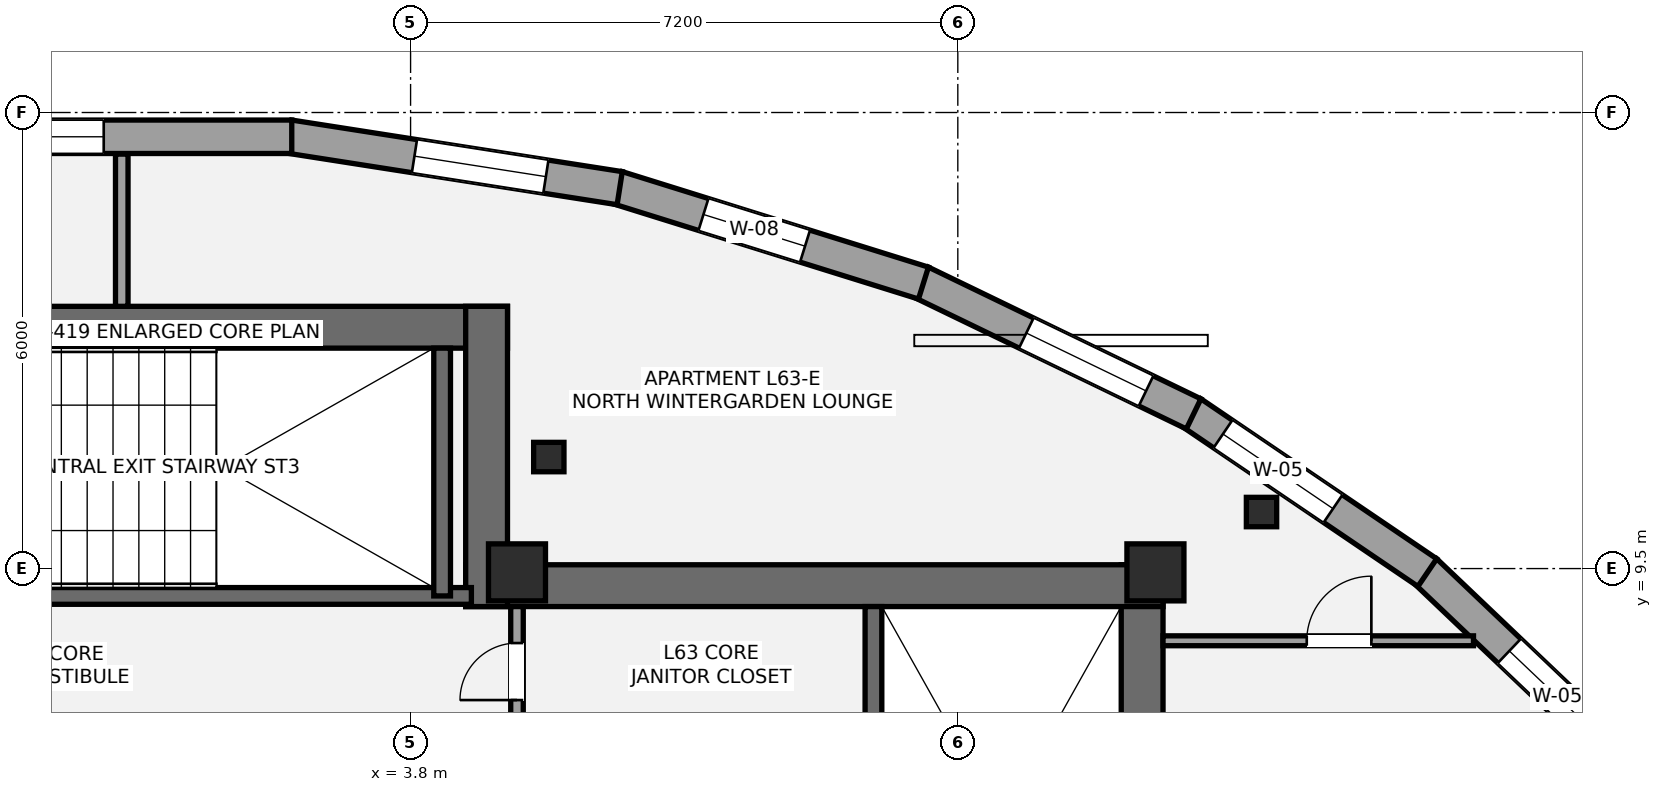
"""IFC4 building model, lengths in metres.
Left out: names, types, materials, properties, quantities, classifications, styles, units other than length and angle.
Written with IfcOpenShell. Run it as: python <this file> out.ifc"""

import sys

from ifc_helpers import new_model, si_unit, direction, frame, frame_2d, origin, origin_2d, place, context, subcontext, project, spatial, rectangle, i_section, extrude, element, fill, save


model = new_model("IFC4")
c1 = context("Model", 3, precision=1e-05, world=origin(), true_north=direction((0.0, 1.0)))
c2 = subcontext(c1, "Body", "Model", "MODEL_VIEW")
j1 = project(units=[si_unit("LENGTHUNIT", "METRE"), si_unit("PLANEANGLEUNIT", "RADIAN")], contexts=[c1])
p1 = place(None, origin())
s1 = spatial("IfcSite", under=j1, at=p1, CompositionType="ELEMENT")
p2 = place(p1, origin())
s2 = spatial("IfcBuilding", under=s1, at=p2, CompositionType="ELEMENT")
p3 = place(p2, frame((0.0, 0.0, 225.75)))
s3 = spatial("IfcBuildingStorey", under=s2, at=p3, CompositionType="ELEMENT", Elevation=225.75)
p4 = place(p3, frame((13.425, 1.3, 0.0), z_axis=(0.0, 0.0, 1.0), x_axis=(0.0, 1.0, 0.0)))
e1 = element("IfcWall", 1, at=p4, inside=s3, PredefinedType="SHEAR", context=c2, shape_type="SweptSolid", body=[
    extrude(rectangle(XDim=8.25, YDim=0.55, at=frame_2d((4.125, 0.0))), origin(), (0.0, 0.0, 1.0), 3.15),
])
p5 = place(p3, frame((4.525, 9.275, 0.0), z_axis=(0.0, 0.0, 1.0), x_axis=(1.0, 0.0, 0.0)))
e2 = element("IfcWall", 2, at=p5, inside=s3, PredefinedType="SHEAR", context=c2, shape_type="SweptSolid", body=[
    extrude(rectangle(XDim=9.175, YDim=0.55, at=frame_2d((4.587, 0.0))), origin(), (0.0, 0.0, 1.0), 3.15),
])
p6 = place(p3, frame((9.89, 1.85, 0.0), z_axis=(0.0, 0.0, 1.0), x_axis=(0.0, 1.0, 0.0)))
e3 = element("IfcWall", 3, at=p6, inside=s3, PredefinedType="SHEAR", context=c2, shape_type="SweptSolid", body=[
    extrude(rectangle(XDim=7.15, YDim=0.22, at=frame_2d((3.575, 0.0))), origin(), (0.0, 0.0, 1.0), 3.15),
])
p7 = place(p3, frame((-5.075, 12.675, 0.0), z_axis=(0.0, 0.0, 1.0), x_axis=(1.0, 0.0, 0.0)))
e4 = element("IfcWall", 4, at=p7, inside=s3, PredefinedType="SHEAR", context=c2, shape_type="SweptSolid", body=[
    extrude(rectangle(XDim=10.15, YDim=0.55, at=frame_2d((5.075, 0.0))), origin(), (0.0, 0.0, 1.0), 3.15),
])
p8 = place(p3, frame((4.8, 9.0, 0.0), z_axis=(0.0, 0.0, 1.0), x_axis=(0.0, 1.0, 0.0)))
e5 = element("IfcWall", 5, at=p8, inside=s3, PredefinedType="SHEAR", context=c2, shape_type="SweptSolid", body=[
    extrude(rectangle(XDim=3.95, YDim=0.55, at=frame_2d((1.975, 0.0))), origin(), (0.0, 0.0, 1.0), 3.15),
])
p9 = place(p3, frame((-4.7, 9.14, 0.0), z_axis=(0.0, 0.0, 1.0), x_axis=(1.0, 0.0, 0.0)))
e6 = element("IfcWall", 6, at=p9, inside=s3, PredefinedType="SHEAR", context=c2, shape_type="SweptSolid", body=[
    extrude(rectangle(XDim=9.3, YDim=0.22, at=frame_2d((4.65, 0.0))), origin(), (0.0, 0.0, 1.0), 3.15),
])
p10 = place(p9, frame((1.15, 0.0, 0.0)))
e7 = element("IfcOpeningElement", 7, at=p10, cuts=e6, PredefinedType="OPENING", context=c2, shape_type="SweptSolid", body=[
    extrude(rectangle(XDim=1.05, YDim=2.15, at=frame_2d((0.525, 1.075))), frame((0.0, 0.12, 0.0), z_axis=(0.0, -1.0, 0.0), x_axis=(1.0, 0.0, 0.0)), (0.0, 0.0, 1.0), 0.24),
])
p11 = place(p3, frame((4.215, 9.14, 0.0), z_axis=(0.0, 0.0, 1.0), x_axis=(0.0, 1.0, 0.0)))
e8 = element("IfcWall", 8, at=p11, inside=s3, PredefinedType="SHEAR", context=c2, shape_type="SweptSolid", body=[
    extrude(rectangle(XDim=3.26, YDim=0.22, at=frame_2d((1.63, 0.0))), origin(), (0.0, 0.0, 1.0), 3.15),
])
for number, where, z_axis, x_axis in (
    (9, (5.2, 9.45, 0.0), (0.0, 0.0, 1.0), (1.0, 0.0, 0.0)),
    (10, (13.6, 9.45, 0.0), (0.0, 0.0, 1.0), (1.0, 0.0, 0.0)),
):
    element("IfcColumn", number, at=place(p3, frame(where, z_axis=z_axis, x_axis=x_axis)), inside=s3, PredefinedType="PILASTER", context=c2, shape_type="SweptSolid", body=[
        extrude(rectangle(XDim=0.75, YDim=0.75, at=origin_2d()), origin(), (0.0, 0.0, 1.0), 3.15),
    ])
for number, where, z_axis, x_axis in (
    (11, (14.996, 10.244, 0.0), (0.0, 0.0, 1.0), (1.0, 0.0, 0.0)),
    (12, (5.619, 10.967, 0.0), (0.0, 0.0, 1.0), (1.0, 0.0, 0.0)),
):
    element("IfcColumn", number, at=place(p3, frame(where, z_axis=z_axis, x_axis=x_axis)), inside=s3, PredefinedType="COLUMN", context=c2, shape_type="SweptSolid", body=[
        extrude(i_section(OverallWidth=0.399, OverallDepth=0.387, WebThickness=0.021, FlangeThickness=0.033, at=origin_2d()), origin(), (0.0, 0.0, 1.0), 3.15),
    ])
p12 = place(p3, frame((17.149, 9.469, 0.0), z_axis=(0.0, 0.0, 1.0), x_axis=(0.724503260132, -0.689271373306, 0.0)))
e13 = element("IfcWall", 13, at=p12, inside=s3, PredefinedType="STANDARD", context=c2, shape_type="SweptSolid", body=[
    extrude(rectangle(XDim=3.527, YDim=0.44, at=frame_2d((1.764, 0.0))), origin(), (0.0, 0.0, 1.0), 2.336),
])
p13 = place(p12, frame((1.528, 0.0, 0.55)))
e14 = element("IfcOpeningElement", 14, at=p13, cuts=e13, PredefinedType="OPENING", context=c2, shape_type="SweptSolid", body=[
    extrude(rectangle(XDim=1.75, YDim=1.55, at=frame_2d((0.875, 0.775))), frame((0.0, 0.23, 0.0), z_axis=(0.0, -1.0, 0.0), x_axis=(1.0, 0.0, 0.0)), (0.0, 0.0, 1.0), 0.46),
])
p14 = place(p3, frame((14.075, 11.551, 0.0), z_axis=(0.0, 0.0, 1.0), x_axis=(0.827635686249, -0.561265686504, 0.0)))
e15 = element("IfcWall", 15, at=p14, inside=s3, PredefinedType="STANDARD", context=c2, shape_type="SweptSolid", body=[
    extrude(rectangle(XDim=3.749, YDim=0.44, at=frame_2d((1.875, 0.0))), origin(), (0.0, 0.0, 1.0), 2.336),
])
p15 = place(p14, frame((0.5, 0.0, 0.55)))
e16 = element("IfcOpeningElement", 16, at=p15, cuts=e15, PredefinedType="OPENING", context=c2, shape_type="SweptSolid", body=[
    extrude(rectangle(XDim=1.75, YDim=1.55, at=frame_2d((0.875, 0.775))), frame((0.0, 0.23, 0.0), z_axis=(0.0, -1.0, 0.0), x_axis=(1.0, 0.0, 0.0)), (0.0, 0.0, 1.0), 0.46),
])
p16 = place(p3, frame((10.518, 13.268, 0.0), z_axis=(0.0, 0.0, 1.0), x_axis=(0.900331335269, -0.435205108808, 0.0)))
e17 = element("IfcWall", 17, at=p16, inside=s3, PredefinedType="STANDARD", context=c2, shape_type="SweptSolid", body=[
    extrude(rectangle(XDim=3.982, YDim=0.44, at=frame_2d((1.991, 0.0))), origin(), (0.0, 0.0, 1.0), 2.336),
])
p17 = place(p16, frame((1.537, 0.0, 0.55)))
e18 = element("IfcOpeningElement", 18, at=p17, cuts=e17, PredefinedType="OPENING", context=c2, shape_type="SweptSolid", body=[
    extrude(rectangle(XDim=1.75, YDim=1.55, at=frame_2d((0.875, 0.775))), frame((0.0, 0.23, 0.0), z_axis=(0.0, -1.0, 0.0), x_axis=(1.0, 0.0, 0.0)), (0.0, 0.0, 1.0), 0.46),
])
p18 = place(p3, frame((6.52, 14.512, 0.0), z_axis=(0.0, 0.0, 1.0), x_axis=(0.954643532685, -0.297751113352, 0.0)))
e19 = element("IfcWall", 19, at=p18, inside=s3, PredefinedType="STANDARD", context=c2, shape_type="SweptSolid", body=[
    extrude(rectangle(XDim=4.219, YDim=0.44, at=frame_2d((2.11, 0.0))), origin(), (0.0, 0.0, 1.0), 2.336),
])
p19 = place(p18, frame((1.188, 0.0, 0.55)))
e20 = element("IfcOpeningElement", 20, at=p19, cuts=e19, PredefinedType="OPENING", context=c2, shape_type="SweptSolid", body=[
    extrude(rectangle(XDim=1.4, YDim=1.55, at=frame_2d((0.7, 0.775))), frame((0.0, 0.23, 0.0), z_axis=(0.0, -1.0, 0.0), x_axis=(1.0, 0.0, 0.0)), (0.0, 0.0, 1.0), 0.46),
])
p20 = place(p3, frame((2.203, 15.183, 0.0), z_axis=(0.0, 0.0, 1.0), x_axis=(0.988037139715, -0.154216116355, 0.0)))
e21 = element("IfcWall", 21, at=p20, inside=s3, PredefinedType="STANDARD", context=c2, shape_type="SweptSolid", body=[
    extrude(rectangle(XDim=4.401, YDim=0.44, at=frame_2d((2.201, 0.0))), origin(), (0.0, 0.0, 1.0), 2.336),
])
p21 = place(p20, frame((1.668, 0.0, 0.55)))
e22 = element("IfcOpeningElement", 22, at=p21, cuts=e21, PredefinedType="OPENING", context=c2, shape_type="SweptSolid", body=[
    extrude(rectangle(XDim=1.75, YDim=1.55, at=frame_2d((0.875, 0.775))), frame((0.0, 0.23, 0.0), z_axis=(0.0, -1.0, 0.0), x_axis=(1.0, 0.0, 0.0)), (0.0, 0.0, 1.0), 0.46),
])
p22 = place(p3, frame((-2.237, 15.181, 0.0), z_axis=(0.0, 0.0, 1.0), x_axis=(1.0, 0.0, 0.0)))
e23 = element("IfcWall", 23, at=p22, inside=s3, PredefinedType="STANDARD", context=c2, shape_type="SweptSolid", body=[
    extrude(rectangle(XDim=4.474, YDim=0.44, at=frame_2d((2.237, 0.0))), origin(), (0.0, 0.0, 1.0), 2.336),
])
p23 = place(p22, frame((0.25, 0.0, 0.55)))
e24 = element("IfcOpeningElement", 24, at=p23, cuts=e23, PredefinedType="OPENING", context=c2, shape_type="SweptSolid", body=[
    extrude(rectangle(XDim=1.75, YDim=1.55, at=frame_2d((0.875, 0.775))), frame((0.0, 0.23, 0.0), z_axis=(0.0, -1.0, 0.0), x_axis=(1.0, 0.0, 0.0)), (0.0, 0.0, 1.0), 0.46),
])
p24 = place(p3, frame((5.2, 7.42, 0.0), z_axis=(0.0, 0.0, 1.0), x_axis=(0.0, 1.0, 0.0)))
e25 = element("IfcWall", 25, at=p24, inside=s3, PredefinedType="PARTITIONING", context=c2, shape_type="SweptSolid", body=[
    extrude(rectangle(XDim=1.58, YDim=0.165, at=frame_2d((0.79, 0.0))), origin(), (0.0, 0.0, 1.0), 2.97),
])
p25 = place(p24, frame((0.35, 0.0, 0.0)))
e26 = element("IfcOpeningElement", 26, at=p25, cuts=e25, PredefinedType="OPENING", context=c2, shape_type="SweptSolid", body=[
    extrude(rectangle(XDim=0.75, YDim=2.1, at=frame_2d((0.375, 1.05))), frame((0.0, 0.093, 0.0), z_axis=(0.0, -1.0, 0.0), x_axis=(1.0, 0.0, 0.0)), (0.0, 0.0, 1.0), 0.185),
])
p26 = place(p3, frame((0.0, 12.95, 0.0), z_axis=(0.0, 0.0, 1.0), x_axis=(0.0, 1.0, 0.0)))
e27 = element("IfcWall", 27, at=p26, inside=s3, PredefinedType="PARTITIONING", context=c2, shape_type="SweptSolid", body=[
    extrude(rectangle(XDim=2.003, YDim=0.165, at=frame_2d((1.001, 0.0))), origin(), (0.0, 0.0, 1.0), 2.97),
])
p27 = place(p3, frame((13.7, 8.55, 0.0), z_axis=(0.0, 0.0, 1.0), x_axis=(1.0, 0.0, 0.0)))
e28 = element("IfcWall", 28, at=p27, inside=s3, PredefinedType="PARTITIONING", context=c2, shape_type="SweptSolid", body=[
    extrude(rectangle(XDim=4.085, YDim=0.13, at=frame_2d((2.042, 0.0))), origin(), (0.0, 0.0, 1.0), 2.423),
])
p28 = place(p27, frame((1.891, 0.0, 0.0)))
e29 = element("IfcOpeningElement", 29, at=p28, cuts=e28, PredefinedType="OPENING", context=c2, shape_type="SweptSolid", body=[
    extrude(rectangle(XDim=0.85, YDim=2.1, at=frame_2d((0.425, 1.05))), frame((0.0, 0.075, 0.0), z_axis=(0.0, -1.0, 0.0), x_axis=(1.0, 0.0, 0.0)), (0.0, 0.0, 1.0), 0.15),
])
p29 = place(p13, origin())
e30 = element("IfcWindow", 30, at=p29, inside=s3, PartitioningType="SINGLE_PANEL", PredefinedType="WINDOW", context=c2, shape_type="SweptSolid", body=[
    extrude(rectangle(XDim=1.75, YDim=1.55, at=frame_2d((0.875, 0.775))), frame((0.0, -0.01, 0.0), z_axis=(0.0, -1.0, 0.0), x_axis=(1.0, 0.0, 0.0)), (0.0, 0.0, 1.0), 0.06),
])
fill(e14, e30)
p30 = place(p15, origin())
e31 = element("IfcWindow", 31, at=p30, inside=s3, PartitioningType="SINGLE_PANEL", PredefinedType="WINDOW", context=c2, shape_type="SweptSolid", body=[
    extrude(rectangle(XDim=1.75, YDim=1.55, at=frame_2d((0.875, 0.775))), frame((0.0, -0.01, 0.0), z_axis=(0.0, -1.0, 0.0), x_axis=(1.0, 0.0, 0.0)), (0.0, 0.0, 1.0), 0.06),
])
fill(e16, e31)
p31 = place(p17, origin())
e32 = element("IfcWindow", 32, at=p31, inside=s3, PartitioningType="SINGLE_PANEL", PredefinedType="WINDOW", context=c2, shape_type="SweptSolid", body=[
    extrude(rectangle(XDim=1.75, YDim=1.55, at=frame_2d((0.875, 0.775))), frame((0.0, -0.01, 0.0), z_axis=(0.0, -1.0, 0.0), x_axis=(1.0, 0.0, 0.0)), (0.0, 0.0, 1.0), 0.06),
])
fill(e18, e32)
p32 = place(p19, origin())
e33 = element("IfcWindow", 33, at=p32, inside=s3, PartitioningType="SINGLE_PANEL", PredefinedType="WINDOW", context=c2, shape_type="SweptSolid", body=[
    extrude(rectangle(XDim=1.4, YDim=1.55, at=frame_2d((0.7, 0.775))), frame((0.0, -0.01, 0.0), z_axis=(0.0, -1.0, 0.0), x_axis=(1.0, 0.0, 0.0)), (0.0, 0.0, 1.0), 0.06),
])
fill(e20, e33)
p33 = place(p21, origin())
e34 = element("IfcWindow", 34, at=p33, inside=s3, PartitioningType="SINGLE_PANEL", PredefinedType="WINDOW", context=c2, shape_type="SweptSolid", body=[
    extrude(rectangle(XDim=1.75, YDim=1.55, at=frame_2d((0.875, 0.775))), frame((0.0, -0.01, 0.0), z_axis=(0.0, -1.0, 0.0), x_axis=(1.0, 0.0, 0.0)), (0.0, 0.0, 1.0), 0.06),
])
fill(e22, e34)
p34 = place(p23, origin())
e35 = element("IfcWindow", 35, at=p34, inside=s3, PartitioningType="SINGLE_PANEL", PredefinedType="WINDOW", context=c2, shape_type="SweptSolid", body=[
    extrude(rectangle(XDim=1.75, YDim=1.55, at=frame_2d((0.875, 0.775))), frame((0.0, -0.01, 0.0), z_axis=(0.0, -1.0, 0.0), x_axis=(1.0, 0.0, 0.0)), (0.0, 0.0, 1.0), 0.06),
])
fill(e24, e35)
p35 = place(p25, origin())
e36 = element("IfcDoor", 36, at=p35, inside=s3, OperationType="SINGLE_SWING_LEFT", PredefinedType="DOOR", context=c2, shape_type="SweptSolid", body=[
    extrude(rectangle(XDim=0.75, YDim=2.1, at=frame_2d((0.375, 1.05))), frame((0.0, 0.025, 0.0), z_axis=(0.0, -1.0, 0.0), x_axis=(1.0, 0.0, 0.0)), (0.0, 0.0, 1.0), 0.05),
])
fill(e26, e36)
p36 = place(p28, origin())
e37 = element("IfcDoor", 37, at=p36, inside=s3, OperationType="SINGLE_SWING_RIGHT", PredefinedType="DOOR", context=c2, shape_type="SweptSolid", body=[
    extrude(rectangle(XDim=0.85, YDim=2.1, at=frame_2d((0.425, 1.05))), frame((0.0, 0.025, 0.0), z_axis=(0.0, -1.0, 0.0), x_axis=(1.0, 0.0, 0.0)), (0.0, 0.0, 1.0), 0.05),
])
fill(e29, e37)
save(model, sys.argv[1])
